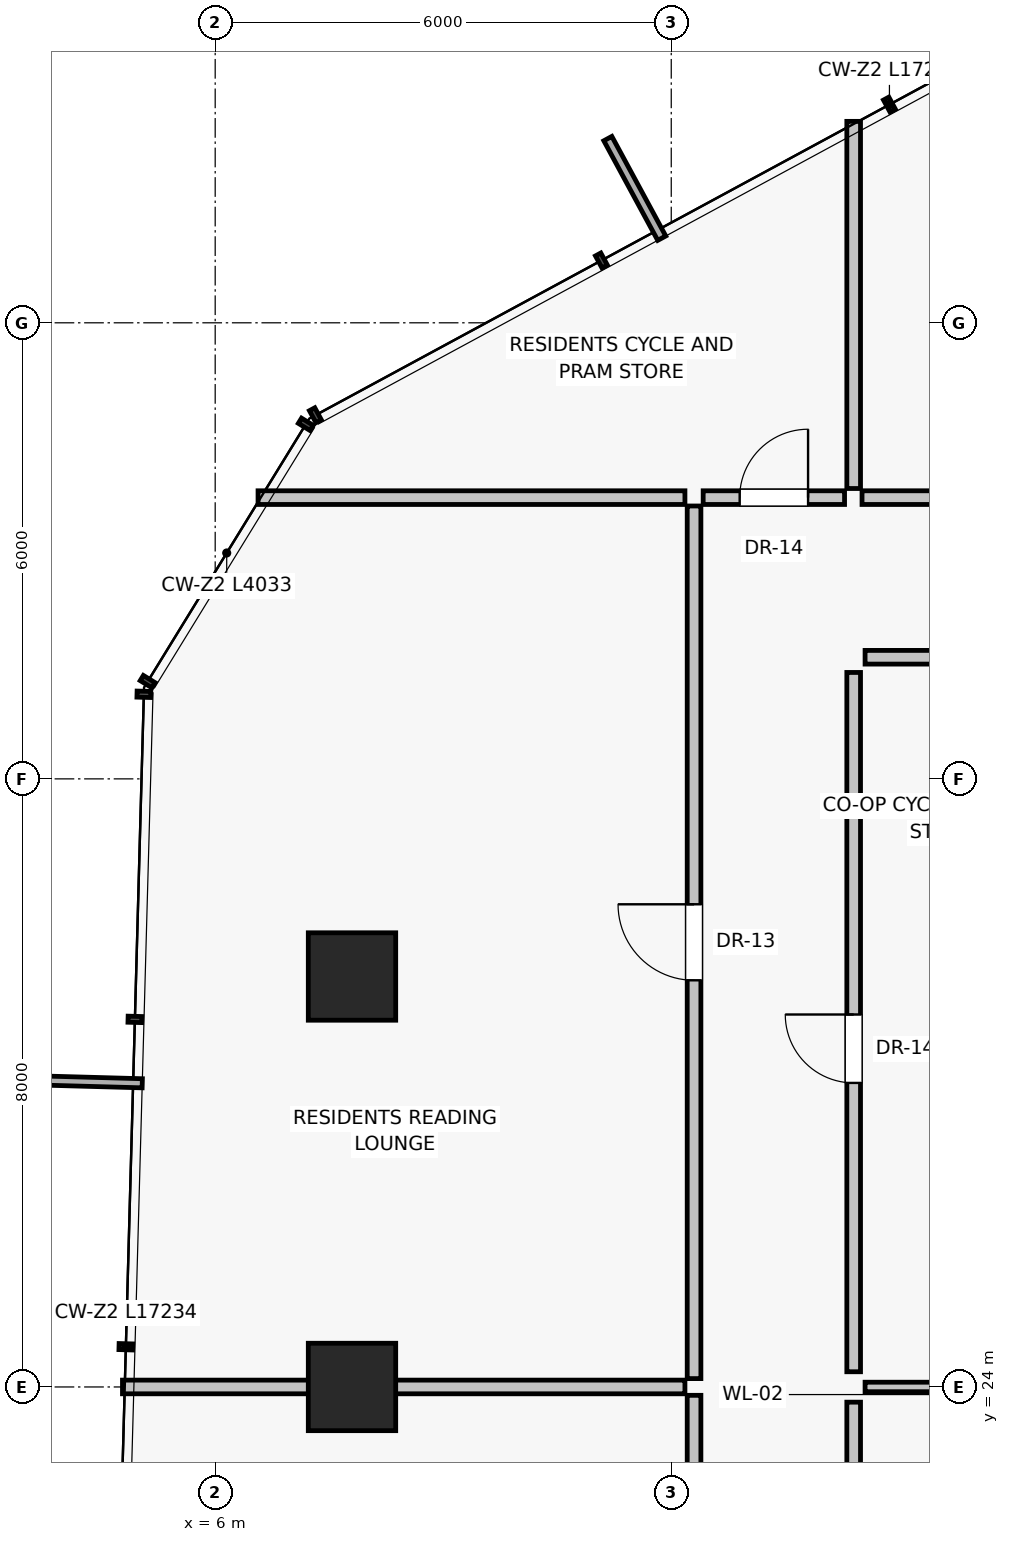
"""IFC4 building model, lengths in metres.
Left out: names, types, materials, properties, quantities, classifications, styles, units other than length and angle.
Written with IfcOpenShell. Run it as: python <this file> out.ifc"""

import sys

from ifc_helpers import new_model, si_unit, direction, frame, frame_2d, origin, origin_2d, place, context, subcontext, project, spatial, rectangle, extrude, source, transform, mapped, element, fill, save


model = new_model("IFC4")
c1 = context("Model", 3, precision=1e-05, world=origin(), true_north=direction((0.0, 1.0)))
c2 = subcontext(c1, "Body", "Model", "MODEL_VIEW")
j1 = project(units=[si_unit("LENGTHUNIT", "METRE"), si_unit("PLANEANGLEUNIT", "RADIAN")], contexts=[c1])
p1 = place(None, origin())
s1 = spatial("IfcSite", under=j1, at=p1, CompositionType="ELEMENT")
p2 = place(p1, origin())
s2 = spatial("IfcBuilding", under=s1, at=p2, CompositionType="ELEMENT")
p3 = place(p2, frame((0.0, 0.0, 123.0)))
s3 = spatial("IfcBuildingStorey", under=s2, at=p3, CompositionType="ELEMENT", Elevation=123.0)
for number, where, z_axis, x_axis in (
    (1, (7.8, 29.4, 0.0), (0.0, 0.0, 1.0), (1.0, 0.0, 0.0)),
    (2, (7.8, 24.0, 0.0), (0.0, 0.0, 1.0), (1.0, 0.0, 0.0)),
):
    element("IfcColumn", number, at=place(p3, frame(where, z_axis=z_axis, x_axis=x_axis)), inside=s3, PredefinedType="COLUMN", context=c2, shape_type="SweptSolid", body=[
        extrude(rectangle(XDim=1.15, YDim=1.15, at=origin_2d()), origin(), (0.0, 0.0, 1.0), 3.25),
    ])
p4 = place(p3, frame((14.4, 14.4, 0.0), z_axis=(0.0, 0.0, 1.0), x_axis=(0.0, 1.0, 0.0)))
e3 = element("IfcWall", 3, at=p4, inside=s3, PredefinedType="PARTITIONING", context=c2, shape_type="SweptSolid", body=[
    extrude(rectangle(XDim=9.4, YDim=0.18, at=frame_2d((4.7, 0.0))), origin(), (0.0, 0.0, 1.0), 3.0),
])
p5 = place(p4, frame((3.8, 0.0, 0.0)))
e4 = element("IfcOpeningElement", 4, at=p5, cuts=e3, PredefinedType="OPENING", context=c2, shape_type="SweptSolid", body=[
    extrude(rectangle(XDim=0.9, YDim=2.01, at=frame_2d((0.45, 1.005))), frame((0.0, 0.1, 0.0), z_axis=(0.0, -1.0, 0.0), x_axis=(1.0, 0.0, 0.0)), (0.0, 0.0, 1.0), 0.2),
])
p6 = place(p3, frame((14.4, 24.2, 0.0), z_axis=(0.0, 0.0, 1.0), x_axis=(0.0, 1.0, 0.0)))
e5 = element("IfcWall", 5, at=p6, inside=s3, PredefinedType="PARTITIONING", context=c2, shape_type="SweptSolid", body=[
    extrude(rectangle(XDim=9.2, YDim=0.18, at=frame_2d((4.6, 0.0))), origin(), (0.0, 0.0, 1.0), 3.0),
])
p7 = place(p6, frame((3.8, 0.0, 0.0)))
e6 = element("IfcOpeningElement", 6, at=p7, cuts=e5, PredefinedType="OPENING", context=c2, shape_type="SweptSolid", body=[
    extrude(rectangle(XDim=0.9, YDim=2.01, at=frame_2d((0.45, 1.005))), frame((0.0, 0.1, 0.0), z_axis=(0.0, -1.0, 0.0), x_axis=(1.0, 0.0, 0.0)), (0.0, 0.0, 1.0), 0.2),
])
p8 = place(p3, frame((14.55, 24.0, 0.0), z_axis=(0.0, 0.0, 1.0), x_axis=(1.0, 0.0, 0.0)))
e7 = element("IfcWall", 7, at=p8, inside=s3, PredefinedType="PARTITIONING", context=c2, shape_type="SweptSolid", body=[
    extrude(rectangle(XDim=2.1, YDim=0.125, at=frame_2d((1.05, 0.0))), origin(), (0.0, 0.0, 1.0), 3.0),
])
p9 = place(p3, frame((14.55, 33.6, 0.0), z_axis=(0.0, 0.0, 1.0), x_axis=(1.0, 0.0, 0.0)))
e8 = element("IfcWall", 8, at=p9, inside=s3, PredefinedType="PARTITIONING", context=c2, shape_type="SweptSolid", body=[
    extrude(rectangle(XDim=2.55, YDim=0.18, at=frame_2d((1.275, 0.0))), origin(), (0.0, 0.0, 1.0), 3.0),
])
p10 = place(p3, frame((14.4, 35.82, 0.0), z_axis=(0.0, 0.0, 1.0), x_axis=(0.0, 1.0, 0.0)))
e9 = element("IfcWall", 9, at=p10, inside=s3, PredefinedType="PARTITIONING", context=c2, shape_type="SweptSolid", body=[
    extrude(rectangle(XDim=4.83, YDim=0.18, at=frame_2d((2.415, 0.0))), origin(), (0.0, 0.0, 1.0), 3.0),
])
p11 = place(p3, frame((14.51, 35.7, 0.0), z_axis=(0.0, 0.0, 1.0), x_axis=(1.0, 0.0, 0.0)))
e10 = element("IfcWall", 10, at=p11, inside=s3, PredefinedType="PARTITIONING", context=c2, shape_type="SweptSolid", body=[
    extrude(rectangle(XDim=9.924, YDim=0.18, at=frame_2d((4.962, 0.0))), origin(), (0.0, 0.0, 1.0), 2.58),
])
p12 = place(p11, frame((4.062, 0.0, 0.0)))
e11 = element("IfcOpeningElement", 11, at=p12, cuts=e10, PredefinedType="OPENING", context=c2, shape_type="SweptSolid", body=[
    extrude(rectangle(XDim=1.8, YDim=2.25, at=frame_2d((0.9, 1.125))), frame((0.0, 0.1, 0.0), z_axis=(0.0, -1.0, 0.0), x_axis=(1.0, 0.0, 0.0)), (0.0, 0.0, 1.0), 0.2),
])
p13 = place(p3, frame((12.18, 35.7, 0.0), z_axis=(0.0, 0.0, 1.0), x_axis=(-1.0, 0.0, 0.0)))
e12 = element("IfcWall", 12, at=p13, inside=s3, PredefinedType="PARTITIONING", context=c2, shape_type="SweptSolid", body=[
    extrude(rectangle(XDim=5.616, YDim=0.18, at=frame_2d((2.808, 0.0))), origin(), (0.0, 0.0, 1.0), 3.0),
])
p14 = place(p3, frame((12.3, 17.06, 0.0), z_axis=(0.0, 0.0, 1.0), x_axis=(0.0, 1.0, 0.0)))
e13 = element("IfcWall", 13, at=p14, inside=s3, PredefinedType="PARTITIONING", context=c2, shape_type="SweptSolid", body=[
    extrude(rectangle(XDim=6.83, YDim=0.18, at=frame_2d((3.415, 0.0))), origin(), (0.0, 0.0, 1.0), 2.58),
])
p15 = place(p14, frame((2.915, 0.0, 0.0)))
e14 = element("IfcOpeningElement", 14, at=p15, cuts=e13, PredefinedType="OPENING", context=c2, shape_type="SweptSolid", body=[
    extrude(rectangle(XDim=1.0, YDim=2.01, at=frame_2d((0.5, 1.005))), frame((0.0, 0.1, 0.0), z_axis=(0.0, -1.0, 0.0), x_axis=(1.0, 0.0, 0.0)), (0.0, 0.0, 1.0), 0.2),
])
p16 = place(p3, frame((12.3, 24.11, 0.0), z_axis=(0.0, 0.0, 1.0), x_axis=(0.0, 1.0, 0.0)))
e15 = element("IfcWall", 15, at=p16, inside=s3, PredefinedType="PARTITIONING", context=c2, shape_type="SweptSolid", body=[
    extrude(rectangle(XDim=11.48, YDim=0.18, at=frame_2d((5.74, 0.0))), origin(), (0.0, 0.0, 1.0), 2.58),
])
p17 = place(p16, frame((5.24, 0.0, 0.0)))
e16 = element("IfcOpeningElement", 16, at=p17, cuts=e15, PredefinedType="OPENING", context=c2, shape_type="SweptSolid", body=[
    extrude(rectangle(XDim=1.0, YDim=2.01, at=frame_2d((0.5, 1.005))), frame((0.0, 0.1, 0.0), z_axis=(0.0, -1.0, 0.0), x_axis=(1.0, 0.0, 0.0)), (0.0, 0.0, 1.0), 0.2),
])
p18 = place(p3, frame((12.18, 24.0, 0.0), z_axis=(0.0, 0.0, 1.0), x_axis=(-1.0, 0.0, 0.0)))
e17 = element("IfcWall", 17, at=p18, inside=s3, PredefinedType="PARTITIONING", context=c2, shape_type="SweptSolid", body=[
    extrude(rectangle(XDim=7.4, YDim=0.18, at=frame_2d((3.7, 0.0))), origin(), (0.0, 0.0, 1.0), 3.0),
])
p19 = place(p3, frame((12.42, 35.7, 0.0), z_axis=(0.0, 0.0, 1.0), x_axis=(1.0, 0.0, 0.0)))
e18 = element("IfcWall", 18, at=p19, inside=s3, PredefinedType="PARTITIONING", context=c2, shape_type="SweptSolid", body=[
    extrude(rectangle(XDim=1.86, YDim=0.18, at=frame_2d((0.93, 0.0))), origin(), (0.0, 0.0, 1.0), 3.0),
])
p20 = place(p19, frame((0.48, 0.0, 0.0)))
e19 = element("IfcOpeningElement", 19, at=p20, cuts=e18, PredefinedType="OPENING", context=c2, shape_type="SweptSolid", body=[
    extrude(rectangle(XDim=0.9, YDim=2.01, at=frame_2d((0.45, 1.005))), frame((0.0, 0.1, 0.0), z_axis=(0.0, -1.0, 0.0), x_axis=(1.0, 0.0, 0.0)), (0.0, 0.0, 1.0), 0.2),
])
m1 = source(origin(), c2, "Body", "SweptSolid", [
    extrude(rectangle(XDim=0.9, YDim=2.01, at=frame_2d((0.45, 1.005))), frame((0.0, 0.025, 0.0), z_axis=(0.0, -1.0, 0.0), x_axis=(1.0, 0.0, 0.0)), (0.0, 0.0, 1.0), 0.05),
])
p21 = place(p7, origin())
e20 = element("IfcDoor", 20, at=p21, inside=s3, OperationType="SINGLE_SWING_RIGHT", PredefinedType="DOOR", context=c2, shape_type="MappedRepresentation", body=[
    mapped(m1, transform((0.0, 0.0, 0.0), scale=1.0)),
])
fill(e6, e20)
m2 = source(origin(), c2, "Body", "SweptSolid", [
    extrude(rectangle(XDim=1.0, YDim=2.01, at=frame_2d((0.5, 1.005))), frame((0.0, 0.025, 0.0), z_axis=(0.0, -1.0, 0.0), x_axis=(1.0, 0.0, 0.0)), (0.0, 0.0, 1.0), 0.05),
])
p22 = place(p17, origin())
e21 = element("IfcDoor", 21, at=p22, inside=s3, OperationType="SINGLE_SWING_RIGHT", PredefinedType="DOOR", context=c2, shape_type="MappedRepresentation", body=[
    mapped(m2, transform((0.0, 0.0, 0.0), scale=1.0)),
])
fill(e16, e21)
p23 = place(p20, origin())
e22 = element("IfcDoor", 22, at=p23, inside=s3, OperationType="SINGLE_SWING_RIGHT", PredefinedType="DOOR", context=c2, shape_type="MappedRepresentation", body=[
    mapped(m1, transform((0.0, 0.0, 0.0), scale=1.0)),
])
fill(e19, e22)
save(model, sys.argv[1])
